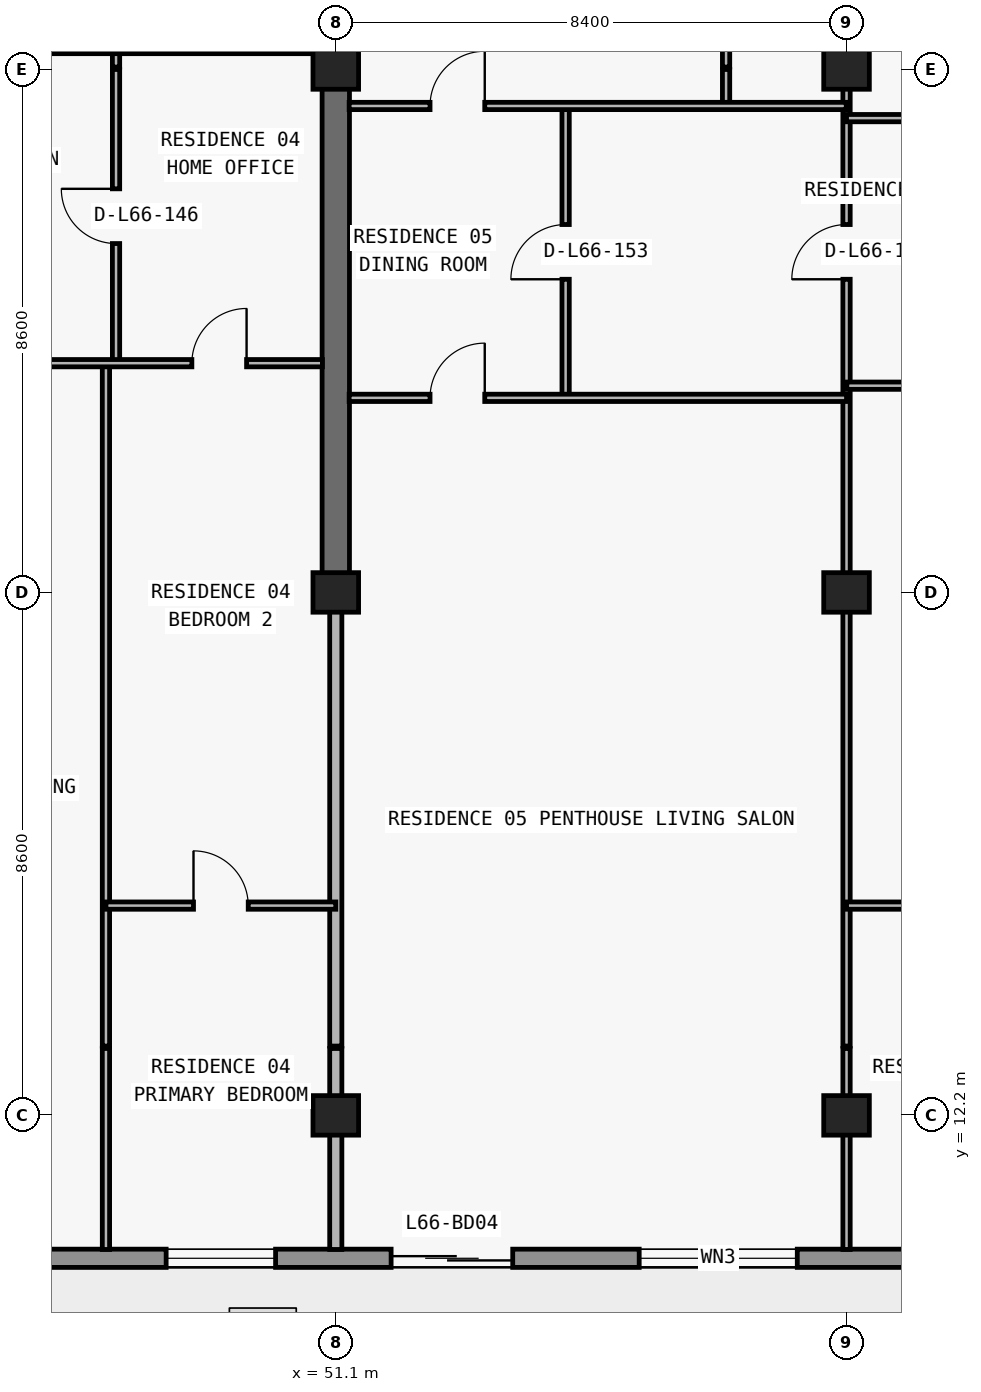
"""IFC4 building model, lengths in metres.
Left out: names, types, materials, properties, quantities, classifications, styles, units other than length and angle.
Written with IfcOpenShell. Run it as: python <this file> out.ifc"""

import sys

from ifc_helpers import new_model, si_unit, direction, frame, frame_2d, origin, origin_2d, place, context, subcontext, project, spatial, rectangle, extrude, element, fill, save


model = new_model("IFC4")
c1 = context("Model", 3, precision=1e-05, world=origin(), true_north=direction((0.0, 1.0)))
c2 = subcontext(c1, "Body", "Model", "MODEL_VIEW")
j1 = project(units=[si_unit("LENGTHUNIT", "METRE"), si_unit("PLANEANGLEUNIT", "RADIAN")], contexts=[c1])
p1 = place(None, origin())
s1 = spatial("IfcSite", under=j1, at=p1, CompositionType="ELEMENT")
p2 = place(p1, origin())
s2 = spatial("IfcBuilding", under=s1, at=p2, CompositionType="ELEMENT")
p3 = place(p2, frame((0.0, 0.0, 236.4)))
s3 = spatial("IfcBuildingStorey", under=s2, at=p3, CompositionType="ELEMENT", Elevation=236.4)
for number, where, z_axis, x_axis in (
    (1, (51.1, 12.2, 0.0), (0.0, 0.0, 1.0), (1.0, 0.0, 0.0)),
    (2, (59.5, 12.2, 0.0), (0.0, 0.0, 1.0), (1.0, 0.0, 0.0)),
    (3, (51.1, 20.8, 0.0), (0.0, 0.0, 1.0), (1.0, 0.0, 0.0)),
    (4, (59.5, 20.8, 0.0), (0.0, 0.0, 1.0), (1.0, 0.0, 0.0)),
    (5, (51.1, 29.4, 0.0), (0.0, 0.0, 1.0), (1.0, 0.0, 0.0)),
    (6, (59.5, 29.4, 0.0), (0.0, 0.0, 1.0), (1.0, 0.0, 0.0)),
):
    element("IfcColumn", number, at=place(p3, frame(where, z_axis=z_axis, x_axis=x_axis)), inside=s3, PredefinedType="COLUMN", context=c2, shape_type="SweptSolid", body=[
        extrude(rectangle(XDim=0.75, YDim=0.65, at=origin_2d()), origin(), (0.0, 0.0, 1.0), 3.05),
    ])
p4 = place(p3, frame((51.1, 20.8, 0.0), z_axis=(0.0, 0.0, 1.0), x_axis=(0.0, 1.0, 0.0)))
e7 = element("IfcWall", 7, at=p4, inside=s3, PredefinedType="SHEAR", context=c2, shape_type="SweptSolid", body=[
    extrude(rectangle(XDim=8.6, YDim=0.45, at=frame_2d((4.3, 0.0))), origin(), (0.0, 0.0, 1.0), 3.05),
])
p5 = place(p3, frame((65.7, 9.85, 0.0), z_axis=(0.0, 0.0, 1.0), x_axis=(-1.0, 0.0, 0.0)))
e8 = element("IfcWall", 8, at=p5, inside=s3, PredefinedType="STANDARD", context=c2, shape_type="SweptSolid", body=[
    extrude(rectangle(XDim=53.6, YDim=0.3, at=frame_2d((26.8, 0.0))), origin(), (0.0, 0.0, 1.0), 3.05),
])
p6 = place(p5, frame((49.5, 0.0, 0.0)))
e9 = element("IfcOpeningElement", 9, at=p6, cuts=e8, PredefinedType="OPENING", context=c2, shape_type="SweptSolid", body=[
    extrude(rectangle(XDim=2.0, YDim=2.3, at=frame_2d((1.0, 1.15))), frame((0.0, 0.16, 0.0), z_axis=(0.0, -1.0, 0.0), x_axis=(1.0, 0.0, 0.0)), (0.0, 0.0, 1.0), 0.32),
])
p7 = place(p5, frame((42.1, 0.0, 0.85)))
e10 = element("IfcOpeningElement", 10, at=p7, cuts=e8, PredefinedType="OPENING", context=c2, shape_type="SweptSolid", body=[
    extrude(rectangle(XDim=2.2, YDim=1.55, at=frame_2d((1.1, 0.775))), frame((0.0, 0.16, 0.0), z_axis=(0.0, -1.0, 0.0), x_axis=(1.0, 0.0, 0.0)), (0.0, 0.0, 1.0), 0.32),
])
p8 = place(p5, frame((35.69, 0.0, 0.0)))
e11 = element("IfcOpeningElement", 11, at=p8, cuts=e8, PredefinedType="OPENING", context=c2, shape_type="SweptSolid", body=[
    extrude(rectangle(XDim=2.0, YDim=2.3, at=frame_2d((1.0, 1.15))), frame((0.0, 0.16, 0.0), z_axis=(0.0, -1.0, 0.0), x_axis=(1.0, 0.0, 0.0)), (0.0, 0.0, 1.0), 0.32),
])
p9 = place(p5, frame((31.59, 0.0, 0.85)))
e12 = element("IfcOpeningElement", 12, at=p9, cuts=e8, PredefinedType="OPENING", context=c2, shape_type="SweptSolid", body=[
    extrude(rectangle(XDim=1.8, YDim=1.55, at=frame_2d((0.9, 0.775))), frame((0.0, 0.16, 0.0), z_axis=(0.0, -1.0, 0.0), x_axis=(1.0, 0.0, 0.0)), (0.0, 0.0, 1.0), 0.32),
])
p10 = place(p5, frame((23.914, 0.0, 0.85)))
e13 = element("IfcOpeningElement", 13, at=p10, cuts=e8, PredefinedType="OPENING", context=c2, shape_type="SweptSolid", body=[
    extrude(rectangle(XDim=2.2, YDim=1.55, at=frame_2d((1.1, 0.775))), frame((0.0, 0.16, 0.0), z_axis=(0.0, -1.0, 0.0), x_axis=(1.0, 0.0, 0.0)), (0.0, 0.0, 1.0), 0.32),
])
p11 = place(p5, frame((19.69, 0.0, 0.0)))
e14 = element("IfcOpeningElement", 14, at=p11, cuts=e8, PredefinedType="OPENING", context=c2, shape_type="SweptSolid", body=[
    extrude(rectangle(XDim=2.0, YDim=2.3, at=frame_2d((1.0, 1.15))), frame((0.0, 0.16, 0.0), z_axis=(0.0, -1.0, 0.0), x_axis=(1.0, 0.0, 0.0)), (0.0, 0.0, 1.0), 0.32),
])
p12 = place(p5, frame((15.59, 0.0, 0.85)))
e15 = element("IfcOpeningElement", 15, at=p12, cuts=e8, PredefinedType="OPENING", context=c2, shape_type="SweptSolid", body=[
    extrude(rectangle(XDim=1.8, YDim=1.55, at=frame_2d((0.9, 0.775))), frame((0.0, 0.16, 0.0), z_axis=(0.0, -1.0, 0.0), x_axis=(1.0, 0.0, 0.0)), (0.0, 0.0, 1.0), 0.32),
])
p13 = place(p5, frame((11.69, 0.0, 0.0)))
e16 = element("IfcOpeningElement", 16, at=p13, cuts=e8, PredefinedType="OPENING", context=c2, shape_type="SweptSolid", body=[
    extrude(rectangle(XDim=2.0, YDim=2.3, at=frame_2d((1.0, 1.15))), frame((0.0, 0.16, 0.0), z_axis=(0.0, -1.0, 0.0), x_axis=(1.0, 0.0, 0.0)), (0.0, 0.0, 1.0), 0.32),
])
p14 = place(p5, frame((7.01, 0.0, 0.65)))
e17 = element("IfcOpeningElement", 17, at=p14, cuts=e8, PredefinedType="OPENING", context=c2, shape_type="SweptSolid", body=[
    extrude(rectangle(XDim=2.6, YDim=1.85, at=frame_2d((1.3, 0.925))), frame((0.0, 0.16, 0.0), z_axis=(0.0, -1.0, 0.0), x_axis=(1.0, 0.0, 0.0)), (0.0, 0.0, 1.0), 0.32),
])
p15 = place(p5, frame((2.0, 0.0, 0.85)))
e18 = element("IfcOpeningElement", 18, at=p15, cuts=e8, PredefinedType="OPENING", context=c2, shape_type="SweptSolid", body=[
    extrude(rectangle(XDim=2.2, YDim=1.55, at=frame_2d((1.1, 0.775))), frame((0.0, 0.16, 0.0), z_axis=(0.0, -1.0, 0.0), x_axis=(1.0, 0.0, 0.0)), (0.0, 0.0, 1.0), 0.32),
])
p16 = place(p3, frame((47.32, 9.995, 0.0), z_axis=(0.0, 0.0, 1.0), x_axis=(0.0, 1.0, 0.0)))
e19 = element("IfcWall", 19, at=p16, inside=s3, PredefinedType="PARTITIONING", context=c2, shape_type="SweptSolid", body=[
    extrude(rectangle(XDim=3.305, YDim=0.12, at=frame_2d((1.652, 0.0))), origin(), (0.0, 0.0, 1.0), 3.05),
])
p17 = place(p3, frame((47.32, 13.34, 0.0), z_axis=(0.0, 0.0, 1.0), x_axis=(0.0, 1.0, 0.0)))
e20 = element("IfcWall", 20, at=p17, inside=s3, PredefinedType="PARTITIONING", context=c2, shape_type="SweptSolid", body=[
    extrude(rectangle(XDim=11.23, YDim=0.12, at=frame_2d((5.615, 0.0))), origin(), (0.0, 0.0, 1.0), 3.05),
])
p18 = place(p3, frame((47.486, 24.575, 0.0), z_axis=(0.0, 0.0, 1.0), x_axis=(0.0, 1.0, 0.0)))
e21 = element("IfcWall", 21, at=p18, inside=s3, PredefinedType="PARTITIONING", context=c2, shape_type="SweptSolid", body=[
    extrude(rectangle(XDim=4.825, YDim=0.12, at=frame_2d((2.413, 0.0))), origin(), (0.0, 0.0, 1.0), 3.05),
])
p19 = place(p18, frame((1.962, 0.0, 0.0)))
e22 = element("IfcOpeningElement", 22, at=p19, cuts=e21, PredefinedType="OPENING", context=c2, shape_type="SweptSolid", body=[
    extrude(rectangle(XDim=0.9, YDim=2.15, at=frame_2d((0.45, 1.075))), frame((0.0, 0.07, 0.0), z_axis=(0.0, -1.0, 0.0), x_axis=(1.0, 0.0, 0.0)), (0.0, 0.0, 1.0), 0.14),
])
p20 = place(p3, frame((47.486, 29.44, 0.0), z_axis=(0.0, 0.0, 1.0), x_axis=(0.0, 1.0, 0.0)))
e23 = element("IfcWall", 23, at=p20, inside=s3, PredefinedType="PARTITIONING", context=c2, shape_type="SweptSolid", body=[
    extrude(rectangle(XDim=0.28, YDim=0.12, at=frame_2d((0.14, 0.0))), origin(), (0.0, 0.0, 1.0), 3.05),
])
p21 = place(p3, frame((51.1, 9.995, 0.0), z_axis=(0.0, 0.0, 1.0), x_axis=(0.0, 1.0, 0.0)))
e24 = element("IfcWall", 24, at=p21, inside=s3, PredefinedType="PARTITIONING", context=c2, shape_type="SweptSolid", body=[
    extrude(rectangle(XDim=3.305, YDim=0.2, at=frame_2d((1.652, 0.0))), origin(), (0.0, 0.0, 1.0), 2.263),
])
p22 = place(p3, frame((51.1, 13.34, 0.0), z_axis=(0.0, 0.0, 1.0), x_axis=(0.0, 1.0, 0.0)))
e25 = element("IfcWall", 25, at=p22, inside=s3, PredefinedType="PARTITIONING", context=c2, shape_type="SweptSolid", body=[
    extrude(rectangle(XDim=7.455, YDim=0.2, at=frame_2d((3.728, 0.0))), origin(), (0.0, 0.0, 1.0), 2.263),
])
p23 = place(p3, frame((51.1, 29.44, 0.0), z_axis=(0.0, 0.0, 1.0), x_axis=(0.0, 1.0, 0.0)))
e26 = element("IfcWall", 26, at=p23, inside=s3, PredefinedType="PARTITIONING", context=c2, shape_type="SweptSolid", body=[
    extrude(rectangle(XDim=4.56, YDim=0.2, at=frame_2d((2.28, 0.0))), origin(), (0.0, 0.0, 1.0), 2.335),
])
p24 = place(p3, frame((54.88, 24.0, 0.0), z_axis=(0.0, 0.0, 1.0), x_axis=(0.0, 1.0, 0.0)))
e27 = element("IfcWall", 27, at=p24, inside=s3, PredefinedType="PARTITIONING", context=c2, shape_type="SweptSolid", body=[
    extrude(rectangle(XDim=4.8, YDim=0.12, at=frame_2d((2.4, 0.0))), origin(), (0.0, 0.0, 1.0), 3.05),
])
p25 = place(p24, frame((1.95, 0.0, 0.0)))
e28 = element("IfcOpeningElement", 28, at=p25, cuts=e27, PredefinedType="OPENING", context=c2, shape_type="SweptSolid", body=[
    extrude(rectangle(XDim=0.9, YDim=2.15, at=frame_2d((0.45, 1.075))), frame((0.0, 0.07, 0.0), z_axis=(0.0, -1.0, 0.0), x_axis=(1.0, 0.0, 0.0)), (0.0, 0.0, 1.0), 0.14),
])
p26 = place(p3, frame((57.519, 28.8, 0.0), z_axis=(0.0, 0.0, 1.0), x_axis=(0.0, 1.0, 0.0)))
e29 = element("IfcWall", 29, at=p26, inside=s3, PredefinedType="PARTITIONING", context=c2, shape_type="SweptSolid", body=[
    extrude(rectangle(XDim=0.6, YDim=0.12, at=frame_2d((0.3, 0.0))), origin(), (0.0, 0.0, 1.0), 3.05),
])
p27 = place(p3, frame((57.519, 29.44, 0.0), z_axis=(0.0, 0.0, 1.0), x_axis=(0.0, 1.0, 0.0)))
e30 = element("IfcWall", 30, at=p27, inside=s3, PredefinedType="PARTITIONING", context=c2, shape_type="SweptSolid", body=[
    extrude(rectangle(XDim=4.56, YDim=0.12, at=frame_2d((2.28, 0.0))), origin(), (0.0, 0.0, 1.0), 3.05),
])
p28 = place(p27, frame((1.855, 0.0, 0.0)))
e31 = element("IfcOpeningElement", 31, at=p28, cuts=e30, PredefinedType="OPENING", context=c2, shape_type="SweptSolid", body=[
    extrude(rectangle(XDim=0.85, YDim=2.1, at=frame_2d((0.425, 1.05))), frame((0.0, 0.07, 0.0), z_axis=(0.0, -1.0, 0.0), x_axis=(1.0, 0.0, 0.0)), (0.0, 0.0, 1.0), 0.14),
])
p29 = place(p3, frame((59.5, 9.995, 0.0), z_axis=(0.0, 0.0, 1.0), x_axis=(0.0, 1.0, 0.0)))
e32 = element("IfcWall", 32, at=p29, inside=s3, PredefinedType="PARTITIONING", context=c2, shape_type="SweptSolid", body=[
    extrude(rectangle(XDim=3.305, YDim=0.12, at=frame_2d((1.652, 0.0))), origin(), (0.0, 0.0, 1.0), 2.263),
])
p30 = place(p3, frame((59.5, 13.34, 0.0), z_axis=(0.0, 0.0, 1.0), x_axis=(0.0, 1.0, 0.0)))
e33 = element("IfcWall", 33, at=p30, inside=s3, PredefinedType="PARTITIONING", context=c2, shape_type="SweptSolid", body=[
    extrude(rectangle(XDim=16.06, YDim=0.12, at=frame_2d((8.03, 0.0))), origin(), (0.0, 0.0, 1.0), 2.263),
])
p31 = place(p30, frame((12.61, 0.0, 0.0)))
e34 = element("IfcOpeningElement", 34, at=p31, cuts=e33, PredefinedType="OPENING", context=c2, shape_type="SweptSolid", body=[
    extrude(rectangle(XDim=0.9, YDim=2.15, at=frame_2d((0.45, 1.075))), frame((0.0, 0.07, 0.0), z_axis=(0.0, -1.0, 0.0), x_axis=(1.0, 0.0, 0.0)), (0.0, 0.0, 1.0), 0.14),
])
p32 = place(p3, frame((59.5, 29.44, 0.0), z_axis=(0.0, 0.0, 1.0), x_axis=(0.0, 1.0, 0.0)))
e35 = element("IfcWall", 35, at=p32, inside=s3, PredefinedType="PARTITIONING", context=c2, shape_type="SweptSolid", body=[
    extrude(rectangle(XDim=4.56, YDim=0.12, at=frame_2d((2.28, 0.0))), origin(), (0.0, 0.0, 1.0), 2.263),
])
p33 = place(p3, frame((47.32, 15.65, 0.0), z_axis=(0.0, 0.0, 1.0), x_axis=(1.0, 0.0, 0.0)))
e36 = element("IfcWall", 36, at=p33, inside=s3, PredefinedType="PARTITIONING", context=c2, shape_type="SweptSolid", body=[
    extrude(rectangle(XDim=3.78, YDim=0.12, at=frame_2d((1.89, 0.0))), origin(), (0.0, 0.0, 1.0), 3.05),
])
p34 = place(p33, frame((1.44, 0.0, 0.0)))
e37 = element("IfcOpeningElement", 37, at=p34, cuts=e36, PredefinedType="OPENING", context=c2, shape_type="SweptSolid", body=[
    extrude(rectangle(XDim=0.9, YDim=2.15, at=frame_2d((0.45, 1.075))), frame((0.0, 0.07, 0.0), z_axis=(0.0, -1.0, 0.0), x_axis=(1.0, 0.0, 0.0)), (0.0, 0.0, 1.0), 0.14),
])
p35 = place(p3, frame((59.5, 15.65, 0.0), z_axis=(0.0, 0.0, 1.0), x_axis=(1.0, 0.0, 0.0)))
e38 = element("IfcWall", 38, at=p35, inside=s3, PredefinedType="PARTITIONING", context=c2, shape_type="SweptSolid", body=[
    extrude(rectangle(XDim=6.2, YDim=0.12, at=frame_2d((3.1, 0.0))), origin(), (0.0, 0.0, 1.0), 3.05),
])
p36 = place(p35, frame((2.65, 0.0, 0.0)))
e39 = element("IfcOpeningElement", 39, at=p36, cuts=e38, PredefinedType="OPENING", context=c2, shape_type="SweptSolid", body=[
    extrude(rectangle(XDim=0.9, YDim=2.15, at=frame_2d((0.45, 1.075))), frame((0.0, 0.07, 0.0), z_axis=(0.0, -1.0, 0.0), x_axis=(1.0, 0.0, 0.0)), (0.0, 0.0, 1.0), 0.14),
])
p37 = place(p3, frame((51.32, 24.0, 0.0), z_axis=(0.0, 0.0, 1.0), x_axis=(1.0, 0.0, 0.0)))
e40 = element("IfcWall", 40, at=p37, inside=s3, PredefinedType="PARTITIONING", context=c2, shape_type="SweptSolid", body=[
    extrude(rectangle(XDim=8.18, YDim=0.12, at=frame_2d((4.09, 0.0))), origin(), (0.0, 0.0, 1.0), 3.05),
])
p38 = place(p37, frame((1.33, 0.0, 0.0)))
e41 = element("IfcOpeningElement", 41, at=p38, cuts=e40, PredefinedType="OPENING", context=c2, shape_type="SweptSolid", body=[
    extrude(rectangle(XDim=0.9, YDim=2.15, at=frame_2d((0.45, 1.075))), frame((0.0, 0.07, 0.0), z_axis=(0.0, -1.0, 0.0), x_axis=(1.0, 0.0, 0.0)), (0.0, 0.0, 1.0), 0.14),
])
p39 = place(p3, frame((59.505, 24.2, 0.0), z_axis=(0.0, 0.0, 1.0), x_axis=(1.0, 0.0, 0.0)))
e42 = element("IfcWall", 42, at=p39, inside=s3, PredefinedType="PARTITIONING", context=c2, shape_type="SweptSolid", body=[
    extrude(rectangle(XDim=6.195, YDim=0.12, at=frame_2d((3.098, 0.0))), origin(), (0.0, 0.0, 1.0), 3.05),
])
p40 = place(p39, frame((2.647, 0.0, 0.0)))
e43 = element("IfcOpeningElement", 43, at=p40, cuts=e42, PredefinedType="OPENING", context=c2, shape_type="SweptSolid", body=[
    extrude(rectangle(XDim=0.9, YDim=2.15, at=frame_2d((0.45, 1.075))), frame((0.0, 0.07, 0.0), z_axis=(0.0, -1.0, 0.0), x_axis=(1.0, 0.0, 0.0)), (0.0, 0.0, 1.0), 0.14),
])
p41 = place(p3, frame((42.7, 24.57, 0.0), z_axis=(0.0, 0.0, 1.0), x_axis=(1.0, 0.0, 0.0)))
e44 = element("IfcWall", 44, at=p41, inside=s3, PredefinedType="PARTITIONING", context=c2, shape_type="SweptSolid", body=[
    extrude(rectangle(XDim=8.18, YDim=0.12, at=frame_2d((4.09, 0.0))), origin(), (0.0, 0.0, 1.0), 3.05),
])
p42 = place(p41, frame((1.86, 0.0, 0.0)))
e45 = element("IfcOpeningElement", 45, at=p42, cuts=e44, PredefinedType="OPENING", context=c2, shape_type="SweptSolid", body=[
    extrude(rectangle(XDim=0.9, YDim=2.15, at=frame_2d((0.45, 1.075))), frame((0.0, 0.07, 0.0), z_axis=(0.0, -1.0, 0.0), x_axis=(1.0, 0.0, 0.0)), (0.0, 0.0, 1.0), 0.14),
])
p43 = place(p41, frame((6.033, 0.0, 0.0)))
e46 = element("IfcOpeningElement", 46, at=p43, cuts=e44, PredefinedType="OPENING", context=c2, shape_type="SweptSolid", body=[
    extrude(rectangle(XDim=0.9, YDim=2.15, at=frame_2d((0.45, 1.075))), frame((0.0, 0.07, 0.0), z_axis=(0.0, -1.0, 0.0), x_axis=(1.0, 0.0, 0.0)), (0.0, 0.0, 1.0), 0.14),
])
p44 = place(p3, frame((59.5, 28.6, 0.0), z_axis=(0.0, 0.0, 1.0), x_axis=(1.0, 0.0, 0.0)))
e47 = element("IfcWall", 47, at=p44, inside=s3, PredefinedType="PARTITIONING", context=c2, shape_type="SweptSolid", body=[
    extrude(rectangle(XDim=6.2, YDim=0.12, at=frame_2d((3.1, 0.0))), origin(), (0.0, 0.0, 1.0), 3.05),
])
p45 = place(p44, frame((1.761, 0.0, 0.0)))
e48 = element("IfcOpeningElement", 48, at=p45, cuts=e47, PredefinedType="OPENING", context=c2, shape_type="SweptSolid", body=[
    extrude(rectangle(XDim=0.9, YDim=2.15, at=frame_2d((0.45, 1.075))), frame((0.0, 0.07, 0.0), z_axis=(0.0, -1.0, 0.0), x_axis=(1.0, 0.0, 0.0)), (0.0, 0.0, 1.0), 0.14),
])
p46 = place(p3, frame((51.32, 28.8, 0.0), z_axis=(0.0, 0.0, 1.0), x_axis=(1.0, 0.0, 0.0)))
e49 = element("IfcWall", 49, at=p46, inside=s3, PredefinedType="PARTITIONING", context=c2, shape_type="SweptSolid", body=[
    extrude(rectangle(XDim=8.175, YDim=0.12, at=frame_2d((4.087, 0.0))), origin(), (0.0, 0.0, 1.0), 3.05),
])
p47 = place(p46, frame((1.33, 0.0, 0.0)))
e50 = element("IfcOpeningElement", 50, at=p47, cuts=e49, PredefinedType="OPENING", context=c2, shape_type="SweptSolid", body=[
    extrude(rectangle(XDim=0.9, YDim=2.15, at=frame_2d((0.45, 1.075))), frame((0.0, 0.07, 0.0), z_axis=(0.0, -1.0, 0.0), x_axis=(1.0, 0.0, 0.0)), (0.0, 0.0, 1.0), 0.14),
])
p48 = place(p3, frame((42.7, 29.72, 0.0), z_axis=(0.0, 0.0, 1.0), x_axis=(1.0, 0.0, 0.0)))
e51 = element("IfcWall", 51, at=p48, inside=s3, PredefinedType="PARTITIONING", context=c2, shape_type="SweptSolid", body=[
    extrude(rectangle(XDim=8.4, YDim=0.12, at=frame_2d((4.2, 0.0))), origin(), (0.0, 0.0, 1.0), 2.263),
])
p49 = place(p48, frame((1.943, 0.0, 0.0)))
e52 = element("IfcOpeningElement", 52, at=p49, cuts=e51, PredefinedType="OPENING", context=c2, shape_type="SweptSolid", body=[
    extrude(rectangle(XDim=0.9, YDim=2.15, at=frame_2d((0.45, 1.075))), frame((0.0, 0.07, 0.0), z_axis=(0.0, -1.0, 0.0), x_axis=(1.0, 0.0, 0.0)), (0.0, 0.0, 1.0), 0.14),
])
p50 = place(p12, origin())
e53 = element("IfcWindow", 53, at=p50, inside=s3, PartitioningType="SINGLE_PANEL", PredefinedType="WINDOW", context=c2, shape_type="SweptSolid", body=[
    extrude(rectangle(XDim=1.8, YDim=1.55, at=frame_2d((0.9, 0.775))), frame((0.0, 0.03, 0.0), z_axis=(0.0, -1.0, 0.0), x_axis=(1.0, 0.0, 0.0)), (0.0, 0.0, 1.0), 0.06),
])
fill(e15, e53)
p51 = place(p13, origin())
e54 = element("IfcDoor", 54, at=p51, inside=s3, OperationType="DOUBLE_DOOR_SLIDING", PredefinedType="DOOR", context=c2, shape_type="SweptSolid", body=[
    extrude(rectangle(XDim=2.0, YDim=2.3, at=frame_2d((1.0, 1.15))), frame((0.0, 0.025, 0.0), z_axis=(0.0, -1.0, 0.0), x_axis=(1.0, 0.0, 0.0)), (0.0, 0.0, 1.0), 0.05),
])
fill(e16, e54)
p52 = place(p14, origin())
e55 = element("IfcWindow", 55, at=p52, inside=s3, PartitioningType="SINGLE_PANEL", PredefinedType="WINDOW", context=c2, shape_type="SweptSolid", body=[
    extrude(rectangle(XDim=2.6, YDim=1.85, at=frame_2d((1.3, 0.925))), frame((0.0, 0.03, 0.0), z_axis=(0.0, -1.0, 0.0), x_axis=(1.0, 0.0, 0.0)), (0.0, 0.0, 1.0), 0.06),
])
fill(e17, e55)
p53 = place(p19, origin())
e56 = element("IfcDoor", 56, at=p53, inside=s3, OperationType="SINGLE_SWING_RIGHT", PredefinedType="DOOR", context=c2, shape_type="SweptSolid", body=[
    extrude(rectangle(XDim=0.9, YDim=2.15, at=frame_2d((0.45, 1.075))), frame((0.0, 0.025, 0.0), z_axis=(0.0, -1.0, 0.0), x_axis=(1.0, 0.0, 0.0)), (0.0, 0.0, 1.0), 0.05),
])
fill(e22, e56)
p54 = place(p43, origin())
e57 = element("IfcDoor", 57, at=p54, inside=s3, OperationType="SINGLE_SWING_RIGHT", PredefinedType="DOOR", context=c2, shape_type="SweptSolid", body=[
    extrude(rectangle(XDim=0.9, YDim=2.15, at=frame_2d((0.45, 1.075))), frame((0.0, 0.025, 0.0), z_axis=(0.0, -1.0, 0.0), x_axis=(1.0, 0.0, 0.0)), (0.0, 0.0, 1.0), 0.05),
])
fill(e46, e57)
p55 = place(p34, origin())
e58 = element("IfcDoor", 58, at=p55, inside=s3, OperationType="SINGLE_SWING_LEFT", PredefinedType="DOOR", context=c2, shape_type="SweptSolid", body=[
    extrude(rectangle(XDim=0.9, YDim=2.15, at=frame_2d((0.45, 1.075))), frame((0.0, 0.025, 0.0), z_axis=(0.0, -1.0, 0.0), x_axis=(1.0, 0.0, 0.0)), (0.0, 0.0, 1.0), 0.05),
])
fill(e37, e58)
p56 = place(p47, origin())
e59 = element("IfcDoor", 59, at=p56, inside=s3, OperationType="SINGLE_SWING_RIGHT", PredefinedType="DOOR", context=c2, shape_type="SweptSolid", body=[
    extrude(rectangle(XDim=0.9, YDim=2.15, at=frame_2d((0.45, 1.075))), frame((0.0, 0.025, 0.0), z_axis=(0.0, -1.0, 0.0), x_axis=(1.0, 0.0, 0.0)), (0.0, 0.0, 1.0), 0.05),
])
fill(e50, e59)
p57 = place(p25, origin())
e60 = element("IfcDoor", 60, at=p57, inside=s3, OperationType="SINGLE_SWING_LEFT", PredefinedType="DOOR", context=c2, shape_type="SweptSolid", body=[
    extrude(rectangle(XDim=0.9, YDim=2.15, at=frame_2d((0.45, 1.075))), frame((0.0, 0.025, 0.0), z_axis=(0.0, -1.0, 0.0), x_axis=(1.0, 0.0, 0.0)), (0.0, 0.0, 1.0), 0.05),
])
fill(e28, e60)
p58 = place(p38, origin())
e61 = element("IfcDoor", 61, at=p58, inside=s3, OperationType="SINGLE_SWING_RIGHT", PredefinedType="DOOR", context=c2, shape_type="SweptSolid", body=[
    extrude(rectangle(XDim=0.9, YDim=2.15, at=frame_2d((0.45, 1.075))), frame((0.0, 0.025, 0.0), z_axis=(0.0, -1.0, 0.0), x_axis=(1.0, 0.0, 0.0)), (0.0, 0.0, 1.0), 0.05),
])
fill(e41, e61)
p59 = place(p31, origin())
e62 = element("IfcDoor", 62, at=p59, inside=s3, OperationType="SINGLE_SWING_LEFT", PredefinedType="DOOR", context=c2, shape_type="SweptSolid", body=[
    extrude(rectangle(XDim=0.9, YDim=2.15, at=frame_2d((0.45, 1.075))), frame((0.0, 0.025, 0.0), z_axis=(0.0, -1.0, 0.0), x_axis=(1.0, 0.0, 0.0)), (0.0, 0.0, 1.0), 0.05),
])
fill(e34, e62)
save(model, sys.argv[1])
